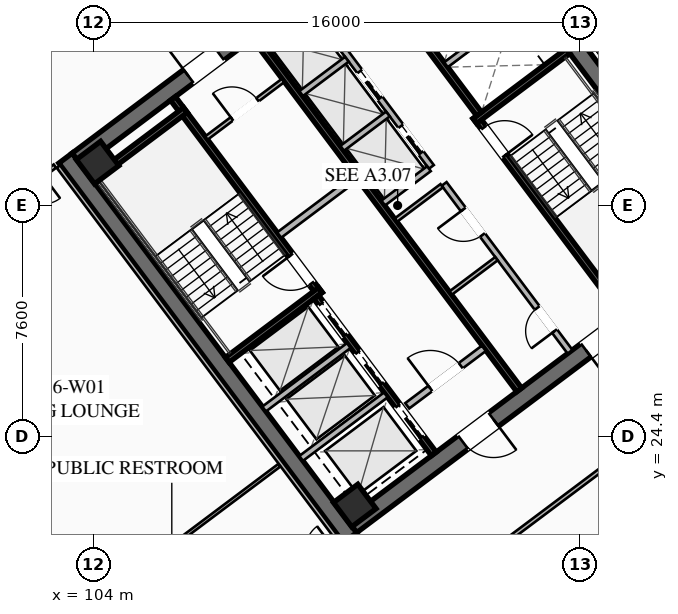
"""IFC4 building model, lengths in metres.
Left out: names, types, materials, properties, quantities, classifications, styles, units other than length and angle.
Written with IfcOpenShell. Run it as: python <this file> out.ifc"""

import sys

from ifc_helpers import new_model, si_unit, direction, frame, frame_2d, origin, origin_2d, place, context, subcontext, project, spatial, rectangle, hollow_rectangle, extrude, element, fill, save


model = new_model("IFC4")
c1 = context("Model", 3, precision=1e-05, world=origin(), true_north=direction((0.0, 1.0)))
c2 = subcontext(c1, "Body", "Model", "MODEL_VIEW")
j1 = project(units=[si_unit("LENGTHUNIT", "METRE"), si_unit("PLANEANGLEUNIT", "RADIAN")], contexts=[c1])
p1 = place(None, origin())
s1 = spatial("IfcSite", under=j1, at=p1, CompositionType="ELEMENT")
p2 = place(p1, origin())
s2 = spatial("IfcBuilding", under=s1, at=p2, CompositionType="ELEMENT")
p3 = place(p2, frame((0.0, 0.0, 135.7)))
s3 = spatial("IfcBuildingStorey", under=s2, at=p3, CompositionType="ELEMENT", Elevation=135.7)
for number, where, z_axis, x_axis in (
    (1, (112.436, 21.077, 0.0), (0.0, 0.0, 1.0), (-0.6, 0.8, 0.0)),
    (2, (115.564, 42.923, 0.0), (0.0, 0.0, 1.0), (0.6, -0.8, 0.0)),
):
    element("IfcWall", number, at=place(p3, frame(where, z_axis=z_axis, x_axis=x_axis)), inside=s3, PredefinedType="SHEAR", context=c2, shape_type="SweptSolid", body=[
        extrude(rectangle(XDim=15.6, YDim=0.55, at=frame_2d((7.8, 0.0))), origin(), (0.0, 0.0, 1.0), 3.55),
    ])
p4 = place(p3, frame((124.539, 30.498, 0.0), z_axis=(0.0, 0.0, 1.0), x_axis=(-0.799998054672, -0.600002593761, 0.0)))
e3 = element("IfcWall", 3, at=p4, inside=s3, PredefinedType="SHEAR", context=c2, shape_type="SweptSolid", body=[
    extrude(rectangle(XDim=15.06, YDim=0.55, at=frame_2d((7.53, 0.0))), origin(), (0.0, 0.0, 1.0), 3.55),
])
p5 = place(p4, frame((9.23, 0.0, 0.0)))
e4 = element("IfcOpeningElement", 4, at=p5, cuts=e3, PredefinedType="OPENING", context=c2, shape_type="SweptSolid", body=[
    extrude(rectangle(XDim=1.25, YDim=2.25, at=frame_2d((0.625, 1.125))), frame((0.0, 0.285, 0.0), z_axis=(0.0, -1.0, 0.0), x_axis=(1.0, 0.0, 0.0)), (0.0, 0.0, 1.0), 0.57),
])
p6 = place(p4, frame((4.18, 0.0, 0.0)))
e5 = element("IfcOpeningElement", 5, at=p6, cuts=e3, PredefinedType="OPENING", context=c2, shape_type="SweptSolid", body=[
    extrude(rectangle(XDim=1.25, YDim=2.25, at=frame_2d((0.625, 1.125))), frame((0.0, 0.285, 0.0), z_axis=(0.0, -1.0, 0.0), x_axis=(1.0, 0.0, 0.0)), (0.0, 0.0, 1.0), 0.57),
])
p7 = place(p3, frame((103.461, 33.502, 0.0), z_axis=(0.0, 0.0, 1.0), x_axis=(0.799998054672, 0.600002593761, 0.0)))
e6 = element("IfcWall", 6, at=p7, inside=s3, PredefinedType="SHEAR", context=c2, shape_type="SweptSolid", body=[
    extrude(rectangle(XDim=15.06, YDim=0.55, at=frame_2d((7.53, 0.0))), origin(), (0.0, 0.0, 1.0), 3.55),
])
p8 = place(p7, frame((4.58, 0.0, 0.0)))
e7 = element("IfcOpeningElement", 7, at=p8, cuts=e6, PredefinedType="OPENING", context=c2, shape_type="SweptSolid", body=[
    extrude(rectangle(XDim=1.25, YDim=2.25, at=frame_2d((0.625, 1.125))), frame((0.0, 0.285, 0.0), z_axis=(0.0, -1.0, 0.0), x_axis=(1.0, 0.0, 0.0)), (0.0, 0.0, 1.0), 0.57),
])
p9 = place(p7, frame((9.63, 0.0, 0.0)))
e8 = element("IfcOpeningElement", 8, at=p9, cuts=e6, PredefinedType="OPENING", context=c2, shape_type="SweptSolid", body=[
    extrude(rectangle(XDim=1.25, YDim=2.25, at=frame_2d((0.625, 1.125))), frame((0.0, 0.285, 0.0), z_axis=(0.0, -1.0, 0.0), x_axis=(1.0, 0.0, 0.0)), (0.0, 0.0, 1.0), 0.57),
])
for number, where, z_axis, x_axis in (
    (9, (112.59, 22.13, 0.0), (0.0, 0.0, 1.0), (0.8, 0.6, 0.0)),
    (10, (104.13, 33.41, 0.0), (0.0, 0.0, 1.0), (0.8, 0.6, 0.0)),
):
    element("IfcColumn", number, at=place(p3, frame(where, z_axis=z_axis, x_axis=x_axis)), inside=s3, PredefinedType="COLUMN", context=c2, shape_type="SweptSolid", body=[
        extrude(hollow_rectangle(XDim=1.0, YDim=1.0, WallThickness=0.04, at=origin_2d()), origin(), (0.0, 0.0, 1.0), 3.37),
    ])
p10 = place(p3, frame((111.44, 29.08, 0.0), z_axis=(0.0, 0.0, 1.0), x_axis=(-0.59999029481, 0.8000072788, 0.0)))
e11 = element("IfcWall", 11, at=p10, inside=s3, PredefinedType="SHEAR", context=c2, shape_type="SweptSolid", body=[
    extrude(rectangle(XDim=8.05, YDim=0.2, at=frame_2d((4.025, 0.0))), origin(), (0.0, 0.0, 1.0), 3.37),
])
p11 = place(p10, frame((0.45, 0.0, 0.0)))
e12 = element("IfcOpeningElement", 12, at=p11, cuts=e11, PredefinedType="OPENING", context=c2, shape_type="SweptSolid", body=[
    extrude(rectangle(XDim=1.15, YDim=2.2, at=frame_2d((0.575, 1.1))), frame((0.0, 0.11, 0.0), z_axis=(0.0, -1.0, 0.0), x_axis=(1.0, 0.0, 0.0)), (0.0, 0.0, 1.0), 0.22),
])
for number, where, z_axis, x_axis in (
    (13, (108.396, 26.922, 0.0), (0.0, 0.0, 1.0), (0.8, 0.6, 0.0)),
    (14, (103.956, 32.842, 0.0), (0.0, 0.0, 1.0), (0.8, 0.6, 0.0)),
):
    element("IfcWall", number, at=place(p3, frame(where, z_axis=z_axis, x_axis=x_axis)), inside=s3, PredefinedType="SHEAR", context=c2, shape_type="SweptSolid", body=[
        extrude(rectangle(XDim=3.83, YDim=0.2, at=frame_2d((1.915, 0.0))), origin(), (0.0, 0.0, 1.0), 3.37),
    ])
p12 = place(p3, frame((116.56, 34.92, 0.0), z_axis=(0.0, 0.0, 1.0), x_axis=(0.59999029481, -0.8000072788, 0.0)))
e15 = element("IfcWall", 15, at=p12, inside=s3, PredefinedType="SHEAR", context=c2, shape_type="SweptSolid", body=[
    extrude(rectangle(XDim=8.05, YDim=0.2, at=frame_2d((4.025, 0.0))), origin(), (0.0, 0.0, 1.0), 3.37),
])
p13 = place(p12, frame((0.45, 0.0, 0.0)))
e16 = element("IfcOpeningElement", 16, at=p13, cuts=e15, PredefinedType="OPENING", context=c2, shape_type="SweptSolid", body=[
    extrude(rectangle(XDim=1.15, YDim=2.2, at=frame_2d((0.575, 1.1))), frame((0.0, 0.11, 0.0), z_axis=(0.0, -1.0, 0.0), x_axis=(1.0, 0.0, 0.0)), (0.0, 0.0, 1.0), 0.22),
])
p14 = place(p3, frame((116.54, 34.78, 0.0), z_axis=(0.0, 0.0, 1.0), x_axis=(0.800015298837, 0.599979601008, 0.0)))
e17 = element("IfcWall", 17, at=p14, inside=s3, PredefinedType="SHEAR", context=c2, shape_type="SweptSolid", body=[
    extrude(rectangle(XDim=3.83, YDim=0.2, at=frame_2d((1.915, 0.0))), origin(), (0.0, 0.0, 1.0), 3.37),
])
p15 = place(p3, frame((117.998, 25.936, 0.0), z_axis=(0.0, 0.0, 1.0), x_axis=(-0.600002693989, 0.799997979501, 0.0)))
e18 = element("IfcWall", 18, at=p15, inside=s3, PredefinedType="SHEAR", context=c2, shape_type="SweptSolid", body=[
    extrude(rectangle(XDim=14.5, YDim=0.2, at=frame_2d((7.25, 0.0))), origin(), (0.0, 0.0, 1.0), 3.37),
])
p16 = place(p3, frame((110.104, 31.028, 0.0), z_axis=(0.0, 0.0, 1.0), x_axis=(0.800018601094, 0.59997519774, 0.0)))
e19 = element("IfcWall", 19, at=p16, inside=s3, PredefinedType="SOLIDWALL", context=c2, shape_type="SweptSolid", body=[
    extrude(rectangle(XDim=3.15, YDim=0.22, at=frame_2d((1.575, 0.0))), origin(), (0.0, 0.0, 1.0), 2.723),
])
p17 = place(p3, frame((114.316, 25.412, 0.0), z_axis=(0.0, 0.0, 1.0), x_axis=(0.800018601094, 0.59997519774, 0.0)))
e20 = element("IfcWall", 20, at=p17, inside=s3, PredefinedType="SOLIDWALL", context=c2, shape_type="SweptSolid", body=[
    extrude(rectangle(XDim=3.15, YDim=0.22, at=frame_2d((1.575, 0.0))), origin(), (0.0, 0.0, 1.0), 2.723),
])
p18 = place(p17, frame((0.95, 0.0, 0.0)))
e21 = element("IfcOpeningElement", 21, at=p18, cuts=e20, PredefinedType="OPENING", context=c2, shape_type="SweptSolid", body=[
    extrude(rectangle(XDim=1.25, YDim=2.25, at=frame_2d((0.625, 1.125))), frame((0.0, 0.12, 0.0), z_axis=(0.0, -1.0, 0.0), x_axis=(1.0, 0.0, 0.0)), (0.0, 0.0, 1.0), 0.24),
])
p19 = place(p3, frame((115.19, 23.83, 0.0), z_axis=(0.0, 0.0, 1.0), x_axis=(-0.599993943644, 0.800004542231, 0.0)))
e22 = element("IfcWall", 22, at=p19, inside=s3, PredefinedType="SHEAR", context=c2, shape_type="SweptSolid", body=[
    extrude(rectangle(XDim=6.45, YDim=0.2, at=frame_2d((3.225, 0.0))), origin(), (0.0, 0.0, 1.0), 3.37),
])
p20 = place(p19, frame((4.875, 0.0, 0.0)))
e23 = element("IfcOpeningElement", 23, at=p20, cuts=e22, PredefinedType="OPENING", context=c2, shape_type="SweptSolid", body=[
    extrude(rectangle(XDim=1.3, YDim=2.25, at=frame_2d((0.65, 1.125))), frame((0.0, 0.11, 0.0), z_axis=(0.0, -1.0, 0.0), x_axis=(1.0, 0.0, 0.0)), (0.0, 0.0, 1.0), 0.22),
])
p21 = place(p19, frame((2.875, 0.0, 0.0)))
e24 = element("IfcOpeningElement", 24, at=p21, cuts=e22, PredefinedType="OPENING", context=c2, shape_type="SweptSolid", body=[
    extrude(rectangle(XDim=1.3, YDim=2.25, at=frame_2d((0.65, 1.125))), frame((0.0, 0.11, 0.0), z_axis=(0.0, -1.0, 0.0), x_axis=(1.0, 0.0, 0.0)), (0.0, 0.0, 1.0), 0.22),
])
p22 = place(p19, frame((0.675, 0.0, 0.0)))
e25 = element("IfcOpeningElement", 25, at=p22, cuts=e22, PredefinedType="OPENING", context=c2, shape_type="SweptSolid", body=[
    extrude(rectangle(XDim=1.3, YDim=2.25, at=frame_2d((0.65, 1.125))), frame((0.0, 0.11, 0.0), z_axis=(0.0, -1.0, 0.0), x_axis=(1.0, 0.0, 0.0)), (0.0, 0.0, 1.0), 0.22),
])
for number, where, z_axis, x_axis in (
    (26, (110.826, 23.682, 0.0), (0.0, 0.0, 1.0), (0.8, 0.6, 0.0)),
    (27, (109.608, 25.306, 0.0), (0.0, 0.0, 1.0), (0.8, 0.6, 0.0)),
):
    element("IfcWall", number, at=place(p3, frame(where, z_axis=z_axis, x_axis=x_axis)), inside=s3, PredefinedType="SOLIDWALL", context=c2, shape_type="SweptSolid", body=[
        extrude(rectangle(XDim=3.48, YDim=0.2, at=frame_2d((1.74, 0.0))), origin(), (0.0, 0.0, 1.0), 3.37),
    ])
p23 = place(p3, frame((112.81, 40.17, 0.0), z_axis=(0.0, 0.0, 1.0), x_axis=(0.599993943644, -0.800004542231, 0.0)))
e28 = element("IfcWall", 28, at=p23, inside=s3, PredefinedType="SHEAR", context=c2, shape_type="SweptSolid", body=[
    extrude(rectangle(XDim=6.45, YDim=0.2, at=frame_2d((3.225, 0.0))), origin(), (0.0, 0.0, 1.0), 3.37),
])
p24 = place(p3, frame((115.59, 36.63, 0.0), z_axis=(0.0, 0.0, 1.0), x_axis=(0.799974743577, 0.600033673754, 0.0)))
e29 = element("IfcWall", 29, at=p24, inside=s3, PredefinedType="SOLIDWALL", context=c2, shape_type="SweptSolid", body=[
    extrude(rectangle(XDim=3.48, YDim=0.2, at=frame_2d((1.74, 0.0))), origin(), (0.0, 0.0, 1.0), 3.37),
])
p25 = place(p3, frame((107.71, 34.22, 0.0), z_axis=(0.0, 0.0, 1.0), x_axis=(0.799981399002, 0.60002480053, 0.0)))
e30 = element("IfcWall", 30, at=p25, inside=s3, PredefinedType="PARTITIONING", context=c2, shape_type="SweptSolid", body=[
    extrude(rectangle(XDim=3.15, YDim=0.135, at=frame_2d((1.575, 0.0))), origin(), (0.0, 0.0, 1.0), 2.723),
])
p26 = place(p25, frame((1.05, 0.0, 0.0)))
e31 = element("IfcOpeningElement", 31, at=p26, cuts=e30, PredefinedType="OPENING", context=c2, shape_type="SweptSolid", body=[
    extrude(rectangle(XDim=1.05, YDim=2.2, at=frame_2d((0.525, 1.1))), frame((0.0, 0.077, 0.0), z_axis=(0.0, -1.0, 0.0), x_axis=(1.0, 0.0, 0.0)), (0.0, 0.0, 1.0), 0.155),
])
p27 = place(p3, frame((119.67, 27.19, 0.0), z_axis=(0.0, 0.0, 1.0), x_axis=(-0.599988677396, 0.800008491828, 0.0)))
e32 = element("IfcWall", 32, at=p27, inside=s3, PredefinedType="SOLIDWALL", context=c2, shape_type="SweptSolid", body=[
    extrude(rectangle(XDim=6.9, YDim=0.2, at=frame_2d((3.45, 0.0))), origin(), (0.0, 0.0, 1.0), 2.723),
])
p28 = place(p27, frame((0.85, 0.0, 0.0)))
e33 = element("IfcOpeningElement", 33, at=p28, cuts=e32, PredefinedType="OPENING", context=c2, shape_type="SweptSolid", body=[
    extrude(rectangle(XDim=0.95, YDim=2.05, at=frame_2d((0.475, 1.025))), frame((0.0, 0.11, 0.0), z_axis=(0.0, -1.0, 0.0), x_axis=(1.0, 0.0, 0.0)), (0.0, 0.0, 1.0), 0.22),
])
p29 = place(p27, frame((4.8, 0.0, 0.0)))
e34 = element("IfcOpeningElement", 34, at=p29, cuts=e32, PredefinedType="OPENING", context=c2, shape_type="SweptSolid", body=[
    extrude(rectangle(XDim=1.05, YDim=2.2, at=frame_2d((0.525, 1.1))), frame((0.0, 0.11, 0.0), z_axis=(0.0, -1.0, 0.0), x_axis=(1.0, 0.0, 0.0)), (0.0, 0.0, 1.0), 0.22),
])
for number, where, z_axis, x_axis in (
    (35, (113.946, 31.522, 0.0), (0.0, 0.0, 1.0), (0.8, 0.6, 0.0)),
    (36, (115.746, 29.122, 0.0), (0.0, 0.0, 1.0), (0.8, 0.6, 0.0)),
):
    element("IfcWall", number, at=place(p3, frame(where, z_axis=z_axis, x_axis=x_axis)), inside=s3, PredefinedType="PARTITIONING", context=c2, shape_type="SweptSolid", body=[
        extrude(rectangle(XDim=1.88, YDim=0.135, at=frame_2d((0.94, 0.0))), origin(), (0.0, 0.0, 1.0), 2.723),
    ])
p30 = place(p3, frame((115.11, 33.27, 0.0), z_axis=(0.0, 0.0, 1.0), x_axis=(-0.600011322243, 0.799991508192, 0.0)))
e37 = element("IfcWall", 37, at=p30, inside=s3, PredefinedType="SOLIDWALL", context=c2, shape_type="SweptSolid", body=[
    extrude(rectangle(XDim=6.9, YDim=0.2, at=frame_2d((3.45, 0.0))), origin(), (0.0, 0.0, 1.0), 3.37),
])
p31 = place(p30, frame((0.575, 0.0, 0.0)))
e38 = element("IfcOpeningElement", 38, at=p31, cuts=e37, PredefinedType="OPENING", context=c2, shape_type="SweptSolid", body=[
    extrude(rectangle(XDim=1.1, YDim=2.2, at=frame_2d((0.55, 1.1))), frame((0.0, 0.11, 0.0), z_axis=(0.0, -1.0, 0.0), x_axis=(1.0, 0.0, 0.0)), (0.0, 0.0, 1.0), 0.22),
])
p32 = place(p30, frame((2.825, 0.0, 0.0)))
e39 = element("IfcOpeningElement", 39, at=p32, cuts=e37, PredefinedType="OPENING", context=c2, shape_type="SweptSolid", body=[
    extrude(rectangle(XDim=1.1, YDim=2.2, at=frame_2d((0.55, 1.1))), frame((0.0, 0.11, 0.0), z_axis=(0.0, -1.0, 0.0), x_axis=(1.0, 0.0, 0.0)), (0.0, 0.0, 1.0), 0.22),
])
p33 = place(p30, frame((5.075, 0.0, 0.0)))
e40 = element("IfcOpeningElement", 40, at=p33, cuts=e37, PredefinedType="OPENING", context=c2, shape_type="SweptSolid", body=[
    extrude(rectangle(XDim=1.1, YDim=2.2, at=frame_2d((0.55, 1.1))), frame((0.0, 0.11, 0.0), z_axis=(0.0, -1.0, 0.0), x_axis=(1.0, 0.0, 0.0)), (0.0, 0.0, 1.0), 0.22),
])
p34 = place(p3, frame((113.526, 32.082, 0.0), z_axis=(0.0, 0.0, 1.0), x_axis=(0.800046745961, 0.599937666993, 0.0)))
e41 = element("IfcWall", 41, at=p34, inside=s3, PredefinedType="SOLIDWALL", context=c2, shape_type="SweptSolid", body=[
    extrude(rectangle(XDim=1.88, YDim=0.2, at=frame_2d((0.94, 0.0))), origin(), (0.0, 0.0, 1.0), 3.37),
])
p35 = place(p3, frame((112.176, 33.882, 0.0), z_axis=(0.0, 0.0, 1.0), x_axis=(0.8, 0.6, 0.0)))
e42 = element("IfcWall", 42, at=p35, inside=s3, PredefinedType="SOLIDWALL", context=c2, shape_type="SweptSolid", body=[
    extrude(rectangle(XDim=1.88, YDim=0.2, at=frame_2d((0.94, 0.0))), origin(), (0.0, 0.0, 1.0), 3.37),
])
p36 = place(p3, frame((110.826, 35.682, 0.0), z_axis=(0.0, 0.0, 1.0), x_axis=(0.799984418148, 0.600020775241, 0.0)))
e43 = element("IfcWall", 43, at=p36, inside=s3, PredefinedType="SOLIDWALL", context=c2, shape_type="SweptSolid", body=[
    extrude(rectangle(XDim=1.88, YDim=0.2, at=frame_2d((0.94, 0.0))), origin(), (0.0, 0.0, 1.0), 3.37),
])
p37 = place(p3, frame((94.79, 31.53, 0.0), z_axis=(0.0, 0.0, 1.0), x_axis=(0.8, 0.6, 0.0)))
e44 = element("IfcWall", 44, at=p37, inside=s3, PredefinedType="PARTITIONING", context=c2, shape_type="SweptSolid", body=[
    extrude(rectangle(XDim=31.3, YDim=0.135, at=frame_2d((15.65, 0.0))), origin(), (0.0, 0.0, 1.0), 2.723),
])
p38 = place(p37, frame((0.3, 0.0, 0.0)))
e45 = element("IfcOpeningElement", 45, at=p38, cuts=e44, PredefinedType="OPENING", context=c2, shape_type="SweptSolid", body=[
    extrude(rectangle(XDim=0.95, YDim=2.05, at=frame_2d((0.475, 1.025))), frame((0.0, 0.077, 0.0), z_axis=(0.0, -1.0, 0.0), x_axis=(1.0, 0.0, 0.0)), (0.0, 0.0, 1.0), 0.155),
])
p39 = place(p37, frame((15.263, 0.0, 0.0)))
e46 = element("IfcOpeningElement", 46, at=p39, cuts=e44, PredefinedType="OPENING", context=c2, shape_type="SweptSolid", body=[
    extrude(rectangle(XDim=0.95, YDim=2.05, at=frame_2d((0.475, 1.025))), frame((0.0, 0.077, 0.0), z_axis=(0.0, -1.0, 0.0), x_axis=(1.0, 0.0, 0.0)), (0.0, 0.0, 1.0), 0.155),
])
p40 = place(p37, frame((30.05, 0.0, 0.0)))
e47 = element("IfcOpeningElement", 47, at=p40, cuts=e44, PredefinedType="OPENING", context=c2, shape_type="SweptSolid", body=[
    extrude(rectangle(XDim=0.95, YDim=2.05, at=frame_2d((0.475, 1.025))), frame((0.0, 0.077, 0.0), z_axis=(0.0, -1.0, 0.0), x_axis=(1.0, 0.0, 0.0)), (0.0, 0.0, 1.0), 0.155),
])
p41 = place(p3, frame((133.102, 32.614, 0.0), z_axis=(0.0, 0.0, 1.0), x_axis=(-0.8, -0.6, 0.0)))
e48 = element("IfcWall", 48, at=p41, inside=s3, PredefinedType="PARTITIONING", context=c2, shape_type="SweptSolid", body=[
    extrude(rectangle(XDim=31.3, YDim=0.135, at=frame_2d((15.65, 0.0))), origin(), (0.0, 0.0, 1.0), 2.723),
])
p42 = place(p41, frame((29.97, 0.0, 0.0)))
e49 = element("IfcOpeningElement", 49, at=p42, cuts=e48, PredefinedType="OPENING", context=c2, shape_type="SweptSolid", body=[
    extrude(rectangle(XDim=0.95, YDim=2.05, at=frame_2d((0.475, 1.025))), frame((0.0, 0.077, 0.0), z_axis=(0.0, -1.0, 0.0), x_axis=(1.0, 0.0, 0.0)), (0.0, 0.0, 1.0), 0.155),
])
p43 = place(p41, frame((0.38, 0.0, 0.0)))
e50 = element("IfcOpeningElement", 50, at=p43, cuts=e48, PredefinedType="OPENING", context=c2, shape_type="SweptSolid", body=[
    extrude(rectangle(XDim=0.95, YDim=2.05, at=frame_2d((0.475, 1.025))), frame((0.0, 0.077, 0.0), z_axis=(0.0, -1.0, 0.0), x_axis=(1.0, 0.0, 0.0)), (0.0, 0.0, 1.0), 0.155),
])
p44 = place(p3, frame((112.104, 20.928, 0.0), z_axis=(0.0, 0.0, 1.0), x_axis=(-0.599994940075, 0.800003794918, 0.0)))
e51 = element("IfcWall", 51, at=p44, inside=s3, PredefinedType="PARTITIONING", context=c2, shape_type="SweptSolid", body=[
    extrude(rectangle(XDim=15.44, YDim=0.135, at=frame_2d((7.72, 0.0))), origin(), (0.0, 0.0, 1.0), 2.723),
])
p45 = place(p3, frame((102.728, 33.296, 0.0), z_axis=(0.0, 0.0, 1.0), x_axis=(-0.800002918023, -0.599996109283, 0.0)))
e52 = element("IfcWall", 52, at=p45, inside=s3, PredefinedType="PARTITIONING", context=c2, shape_type="SweptSolid", body=[
    extrude(rectangle(XDim=10.04, YDim=0.135, at=frame_2d((5.02, 0.0))), origin(), (0.0, 0.0, 1.0), 2.723),
])
p46 = place(p45, frame((0.5, 0.0, 0.0)))
e53 = element("IfcOpeningElement", 53, at=p46, cuts=e52, PredefinedType="OPENING", context=c2, shape_type="SweptSolid", body=[
    extrude(rectangle(XDim=0.95, YDim=2.05, at=frame_2d((0.475, 1.025))), frame((0.0, 0.077, 0.0), z_axis=(0.0, -1.0, 0.0), x_axis=(1.0, 0.0, 0.0)), (0.0, 0.0, 1.0), 0.155),
])
p47 = place(p3, frame((102.076, 17.432, 0.0), z_axis=(0.0, 0.0, 1.0), x_axis=(0.799991245945, 0.600011671896, 0.0)))
e54 = element("IfcWall", 54, at=p47, inside=s3, PredefinedType="PARTITIONING", context=c2, shape_type="SweptSolid", body=[
    extrude(rectangle(XDim=10.04, YDim=0.11, at=frame_2d((5.02, 0.0))), origin(), (0.0, 0.0, 1.0), 2.723),
])
p48 = place(p8, origin())
e55 = element("IfcDoor", 55, at=p48, inside=s3, OperationType="SINGLE_SWING_LEFT", PredefinedType="DOOR", context=c2, shape_type="SweptSolid", body=[
    extrude(rectangle(XDim=1.25, YDim=2.25, at=frame_2d((0.625, 1.125))), frame((0.0, 0.025, 0.0), z_axis=(0.0, -1.0, 0.0), x_axis=(1.0, 0.0, 0.0)), (0.0, 0.0, 1.0), 0.05),
])
fill(e7, e55)
p49 = place(p5, origin())
e56 = element("IfcDoor", 56, at=p49, inside=s3, OperationType="SINGLE_SWING_LEFT", PredefinedType="DOOR", context=c2, shape_type="SweptSolid", body=[
    extrude(rectangle(XDim=1.25, YDim=2.25, at=frame_2d((0.625, 1.125))), frame((0.0, 0.025, 0.0), z_axis=(0.0, -1.0, 0.0), x_axis=(1.0, 0.0, 0.0)), (0.0, 0.0, 1.0), 0.05),
])
fill(e4, e56)
p50 = place(p6, origin())
e57 = element("IfcDoor", 57, at=p50, inside=s3, OperationType="SINGLE_SWING_RIGHT", PredefinedType="DOOR", context=c2, shape_type="SweptSolid", body=[
    extrude(rectangle(XDim=1.25, YDim=2.25, at=frame_2d((0.625, 1.125))), frame((0.0, 0.025, 0.0), z_axis=(0.0, -1.0, 0.0), x_axis=(1.0, 0.0, 0.0)), (0.0, 0.0, 1.0), 0.05),
])
fill(e5, e57)
p51 = place(p11, origin())
e58 = element("IfcDoor", 58, at=p51, inside=s3, OperationType="SINGLE_SWING_RIGHT", PredefinedType="DOOR", context=c2, shape_type="SweptSolid", body=[
    extrude(rectangle(XDim=1.15, YDim=2.2, at=frame_2d((0.575, 1.1))), frame((0.0, 0.025, 0.0), z_axis=(0.0, -1.0, 0.0), x_axis=(1.0, 0.0, 0.0)), (0.0, 0.0, 1.0), 0.05),
])
fill(e12, e58)
p52 = place(p13, origin())
e59 = element("IfcDoor", 59, at=p52, inside=s3, OperationType="SINGLE_SWING_RIGHT", PredefinedType="DOOR", context=c2, shape_type="SweptSolid", body=[
    extrude(rectangle(XDim=1.15, YDim=2.2, at=frame_2d((0.575, 1.1))), frame((0.0, 0.025, 0.0), z_axis=(0.0, -1.0, 0.0), x_axis=(1.0, 0.0, 0.0)), (0.0, 0.0, 1.0), 0.05),
])
fill(e16, e59)
p53 = place(p18, origin())
e60 = element("IfcDoor", 60, at=p53, inside=s3, OperationType="SINGLE_SWING_LEFT", PredefinedType="DOOR", context=c2, shape_type="SweptSolid", body=[
    extrude(rectangle(XDim=1.25, YDim=2.25, at=frame_2d((0.625, 1.125))), frame((0.0, 0.025, 0.0), z_axis=(0.0, -1.0, 0.0), x_axis=(1.0, 0.0, 0.0)), (0.0, 0.0, 1.0), 0.05),
])
fill(e21, e60)
p54 = place(p26, origin())
e61 = element("IfcDoor", 61, at=p54, inside=s3, OperationType="SINGLE_SWING_LEFT", PredefinedType="DOOR", context=c2, shape_type="SweptSolid", body=[
    extrude(rectangle(XDim=1.05, YDim=2.2, at=frame_2d((0.525, 1.1))), frame((0.0, 0.025, 0.0), z_axis=(0.0, -1.0, 0.0), x_axis=(1.0, 0.0, 0.0)), (0.0, 0.0, 1.0), 0.05),
])
fill(e31, e61)
p55 = place(p28, origin())
e62 = element("IfcDoor", 62, at=p55, inside=s3, OperationType="SINGLE_SWING_LEFT", PredefinedType="DOOR", context=c2, shape_type="SweptSolid", body=[
    extrude(rectangle(XDim=0.95, YDim=2.05, at=frame_2d((0.475, 1.025))), frame((0.0, 0.025, 0.0), z_axis=(0.0, -1.0, 0.0), x_axis=(1.0, 0.0, 0.0)), (0.0, 0.0, 1.0), 0.05),
])
fill(e33, e62)
p56 = place(p29, origin())
e63 = element("IfcDoor", 63, at=p56, inside=s3, OperationType="SINGLE_SWING_RIGHT", PredefinedType="DOOR", context=c2, shape_type="SweptSolid", body=[
    extrude(rectangle(XDim=1.05, YDim=2.2, at=frame_2d((0.525, 1.1))), frame((0.0, 0.025, 0.0), z_axis=(0.0, -1.0, 0.0), x_axis=(1.0, 0.0, 0.0)), (0.0, 0.0, 1.0), 0.05),
])
fill(e34, e63)
p57 = place(p20, origin())
e64 = element("IfcDoor", 64, at=p57, inside=s3, OperationType="SLIDING_TO_LEFT", PredefinedType="DOOR", context=c2, shape_type="SweptSolid", body=[
    extrude(rectangle(XDim=1.3, YDim=2.25, at=frame_2d((0.65, 1.125))), frame((0.0, 0.025, 0.0), z_axis=(0.0, -1.0, 0.0), x_axis=(1.0, 0.0, 0.0)), (0.0, 0.0, 1.0), 0.05),
])
fill(e23, e64)
p58 = place(p21, origin())
e65 = element("IfcDoor", 65, at=p58, inside=s3, OperationType="SLIDING_TO_LEFT", PredefinedType="DOOR", context=c2, shape_type="SweptSolid", body=[
    extrude(rectangle(XDim=1.3, YDim=2.25, at=frame_2d((0.65, 1.125))), frame((0.0, 0.025, 0.0), z_axis=(0.0, -1.0, 0.0), x_axis=(1.0, 0.0, 0.0)), (0.0, 0.0, 1.0), 0.05),
])
fill(e24, e65)
p59 = place(p22, origin())
e66 = element("IfcDoor", 66, at=p59, inside=s3, OperationType="SLIDING_TO_LEFT", PredefinedType="DOOR", context=c2, shape_type="SweptSolid", body=[
    extrude(rectangle(XDim=1.3, YDim=2.25, at=frame_2d((0.65, 1.125))), frame((0.0, 0.025, 0.0), z_axis=(0.0, -1.0, 0.0), x_axis=(1.0, 0.0, 0.0)), (0.0, 0.0, 1.0), 0.05),
])
fill(e25, e66)
p60 = place(p31, origin())
e67 = element("IfcDoor", 67, at=p60, inside=s3, OperationType="SLIDING_TO_LEFT", PredefinedType="DOOR", context=c2, shape_type="SweptSolid", body=[
    extrude(rectangle(XDim=1.1, YDim=2.2, at=frame_2d((0.55, 1.1))), frame((0.0, 0.025, 0.0), z_axis=(0.0, -1.0, 0.0), x_axis=(1.0, 0.0, 0.0)), (0.0, 0.0, 1.0), 0.05),
])
fill(e38, e67)
p61 = place(p32, origin())
e68 = element("IfcDoor", 68, at=p61, inside=s3, OperationType="SLIDING_TO_LEFT", PredefinedType="DOOR", context=c2, shape_type="SweptSolid", body=[
    extrude(rectangle(XDim=1.1, YDim=2.2, at=frame_2d((0.55, 1.1))), frame((0.0, 0.025, 0.0), z_axis=(0.0, -1.0, 0.0), x_axis=(1.0, 0.0, 0.0)), (0.0, 0.0, 1.0), 0.05),
])
fill(e39, e68)
save(model, sys.argv[1])
